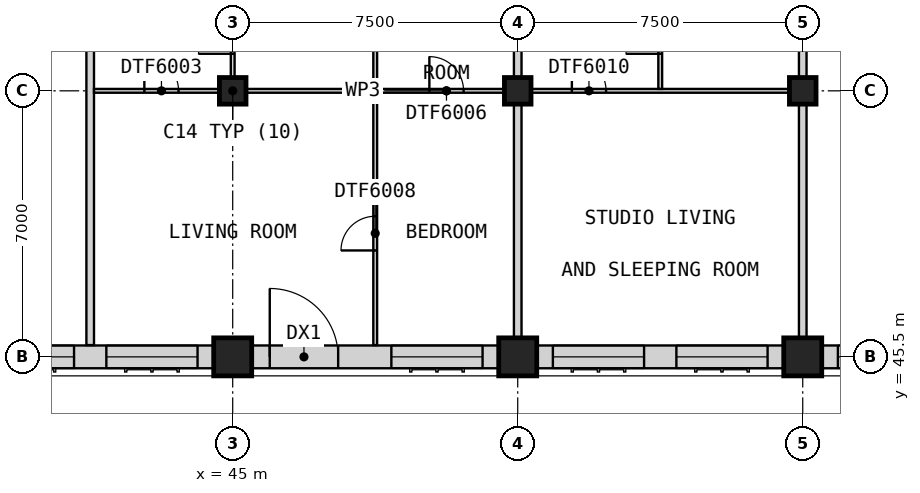
"""IFC4 building model, lengths in metres.
Left out: names, types, materials, properties, quantities, classifications, styles, units other than length and angle.
Written with IfcOpenShell. Run it as: python <this file> out.ifc"""

import sys

from ifc_helpers import new_model, si_unit, direction, frame, frame_2d, origin, origin_2d, place, context, subcontext, project, spatial, rectangle, extrude, element, fill, save


model = new_model("IFC4")
c1 = context("Model", 3, precision=1e-05, world=origin(), true_north=direction((0.0, 1.0)))
c2 = subcontext(c1, "Body", "Model", "MODEL_VIEW")
j1 = project(units=[si_unit("LENGTHUNIT", "METRE"), si_unit("PLANEANGLEUNIT", "RADIAN")], contexts=[c1])
p1 = place(None, origin())
s1 = spatial("IfcSite", under=j1, at=p1, CompositionType="ELEMENT")
p2 = place(p1, origin())
s2 = spatial("IfcBuilding", under=s1, at=p2, CompositionType="ELEMENT")
p3 = place(p2, frame((0.0, 0.0, 266.2)))
s3 = spatial("IfcBuildingStorey", under=s2, at=p3, CompositionType="ELEMENT", Elevation=266.2)
p4 = place(p3, frame((45.0, 45.5, 0.0), z_axis=(0.0, 0.0, 1.0), x_axis=(1.0, 0.0, 0.0)))
e1 = element("IfcColumn", 1, at=p4, inside=s3, PredefinedType="COLUMN", context=c2, shape_type="SweptSolid", body=[
    extrude(rectangle(XDim=1.0, YDim=1.0, at=origin_2d()), origin(), (0.0, 0.0, 1.0), 3.5),
])
p5 = place(p3, frame((45.0, 52.5, 0.0), z_axis=(0.0, 0.0, 1.0), x_axis=(1.0, 0.0, 0.0)))
e2 = element("IfcColumn", 2, at=p5, inside=s3, PredefinedType="COLUMN", context=c2, shape_type="SweptSolid", body=[
    extrude(rectangle(XDim=0.7, YDim=0.7, at=origin_2d()), origin(), (0.0, 0.0, 1.0), 3.5),
])
p6 = place(p3, frame((52.5, 45.5, 0.0), z_axis=(0.0, 0.0, 1.0), x_axis=(1.0, 0.0, 0.0)))
e3 = element("IfcColumn", 3, at=p6, inside=s3, PredefinedType="COLUMN", context=c2, shape_type="SweptSolid", body=[
    extrude(rectangle(XDim=1.0, YDim=1.0, at=origin_2d()), origin(), (0.0, 0.0, 1.0), 3.5),
])
p7 = place(p3, frame((52.5, 52.5, 0.0), z_axis=(0.0, 0.0, 1.0), x_axis=(1.0, 0.0, 0.0)))
e4 = element("IfcColumn", 4, at=p7, inside=s3, PredefinedType="COLUMN", context=c2, shape_type="SweptSolid", body=[
    extrude(rectangle(XDim=0.7, YDim=0.7, at=origin_2d()), origin(), (0.0, 0.0, 1.0), 3.5),
])
p8 = place(p3, frame((60.0, 45.5, 0.0), z_axis=(0.0, 0.0, 1.0), x_axis=(1.0, 0.0, 0.0)))
e5 = element("IfcColumn", 5, at=p8, inside=s3, PredefinedType="COLUMN", context=c2, shape_type="SweptSolid", body=[
    extrude(rectangle(XDim=1.0, YDim=1.0, at=origin_2d()), origin(), (0.0, 0.0, 1.0), 3.5),
])
p9 = place(p3, frame((60.0, 52.5, 0.0), z_axis=(0.0, 0.0, 1.0), x_axis=(1.0, 0.0, 0.0)))
e6 = element("IfcColumn", 6, at=p9, inside=s3, PredefinedType="COLUMN", context=c2, shape_type="SweptSolid", body=[
    extrude(rectangle(XDim=0.7, YDim=0.7, at=origin_2d()), origin(), (0.0, 0.0, 1.0), 3.5),
])
p10 = place(p3, frame((38.0, 45.5, 0.0), z_axis=(0.0, 0.0, 1.0), x_axis=(1.0, 0.0, 0.0)))
e7 = element("IfcWall", 7, at=p10, inside=s3, PredefinedType="SOLIDWALL", context=c2, shape_type="SweptSolid", body=[
    extrude(rectangle(XDim=6.5, YDim=0.6, at=frame_2d((3.25, 0.0))), origin(), (0.0, 0.0, 1.0), 2.75),
])
p11 = place(p10, frame((0.425, 0.0, 0.8)))
e8 = element("IfcOpeningElement", 8, at=p11, cuts=e7, PredefinedType="OPENING", context=c2, shape_type="SweptSolid", body=[
    extrude(rectangle(XDim=2.4, YDim=1.8, at=frame_2d((1.2, 0.9))), frame((0.0, 0.31, 0.0), z_axis=(0.0, -1.0, 0.0), x_axis=(1.0, 0.0, 0.0)), (0.0, 0.0, 1.0), 0.62),
])
p12 = place(p10, frame((3.675, 0.0, 0.8)))
e9 = element("IfcOpeningElement", 9, at=p12, cuts=e7, PredefinedType="OPENING", context=c2, shape_type="SweptSolid", body=[
    extrude(rectangle(XDim=2.4, YDim=1.8, at=frame_2d((1.2, 0.9))), frame((0.0, 0.31, 0.0), z_axis=(0.0, -1.0, 0.0), x_axis=(1.0, 0.0, 0.0)), (0.0, 0.0, 1.0), 0.62),
])
p13 = place(p3, frame((45.5, 45.5, 0.0), z_axis=(0.0, 0.0, 1.0), x_axis=(1.0, 0.0, 0.0)))
e10 = element("IfcWall", 10, at=p13, inside=s3, PredefinedType="SOLIDWALL", context=c2, shape_type="SweptSolid", body=[
    extrude(rectangle(XDim=6.5, YDim=0.6, at=frame_2d((3.25, 0.0))), origin(), (0.0, 0.0, 1.0), 2.75),
])
p14 = place(p13, frame((0.475, 0.0, 0.0)))
e11 = element("IfcOpeningElement", 11, at=p14, cuts=e10, PredefinedType="OPENING", context=c2, shape_type="SweptSolid", body=[
    extrude(rectangle(XDim=1.8, YDim=2.4, at=frame_2d((0.9, 1.2))), frame((0.0, 0.31, 0.0), z_axis=(0.0, -1.0, 0.0), x_axis=(1.0, 0.0, 0.0)), (0.0, 0.0, 1.0), 0.62),
])
p15 = place(p13, frame((3.675, 0.0, 0.8)))
e12 = element("IfcOpeningElement", 12, at=p15, cuts=e10, PredefinedType="OPENING", context=c2, shape_type="SweptSolid", body=[
    extrude(rectangle(XDim=2.4, YDim=1.8, at=frame_2d((1.2, 0.9))), frame((0.0, 0.31, 0.0), z_axis=(0.0, -1.0, 0.0), x_axis=(1.0, 0.0, 0.0)), (0.0, 0.0, 1.0), 0.62),
])
p16 = place(p3, frame((53.0, 45.5, 0.0), z_axis=(0.0, 0.0, 1.0), x_axis=(1.0, 0.0, 0.0)))
e13 = element("IfcWall", 13, at=p16, inside=s3, PredefinedType="SOLIDWALL", context=c2, shape_type="SweptSolid", body=[
    extrude(rectangle(XDim=6.5, YDim=0.6, at=frame_2d((3.25, 0.0))), origin(), (0.0, 0.0, 1.0), 2.75),
])
p17 = place(p16, frame((0.425, 0.0, 0.8)))
e14 = element("IfcOpeningElement", 14, at=p17, cuts=e13, PredefinedType="OPENING", context=c2, shape_type="SweptSolid", body=[
    extrude(rectangle(XDim=2.4, YDim=1.8, at=frame_2d((1.2, 0.9))), frame((0.0, 0.31, 0.0), z_axis=(0.0, -1.0, 0.0), x_axis=(1.0, 0.0, 0.0)), (0.0, 0.0, 1.0), 0.62),
])
p18 = place(p16, frame((3.675, 0.0, 0.8)))
e15 = element("IfcOpeningElement", 15, at=p18, cuts=e13, PredefinedType="OPENING", context=c2, shape_type="SweptSolid", body=[
    extrude(rectangle(XDim=2.4, YDim=1.8, at=frame_2d((1.2, 0.9))), frame((0.0, 0.31, 0.0), z_axis=(0.0, -1.0, 0.0), x_axis=(1.0, 0.0, 0.0)), (0.0, 0.0, 1.0), 0.62),
])
p19 = place(p3, frame((60.5, 45.5, 0.0), z_axis=(0.0, 0.0, 1.0), x_axis=(1.0, 0.0, 0.0)))
e16 = element("IfcWall", 16, at=p19, inside=s3, PredefinedType="SOLIDWALL", context=c2, shape_type="SweptSolid", body=[
    extrude(rectangle(XDim=6.5, YDim=0.6, at=frame_2d((3.25, 0.0))), origin(), (0.0, 0.0, 1.0), 2.75),
])
p20 = place(p19, frame((0.425, 0.0, 0.8)))
e17 = element("IfcOpeningElement", 17, at=p20, cuts=e16, PredefinedType="OPENING", context=c2, shape_type="SweptSolid", body=[
    extrude(rectangle(XDim=2.4, YDim=1.8, at=frame_2d((1.2, 0.9))), frame((0.0, 0.31, 0.0), z_axis=(0.0, -1.0, 0.0), x_axis=(1.0, 0.0, 0.0)), (0.0, 0.0, 1.0), 0.62),
])
p21 = place(p19, frame((3.675, 0.0, 0.8)))
e18 = element("IfcOpeningElement", 18, at=p21, cuts=e16, PredefinedType="OPENING", context=c2, shape_type="SweptSolid", body=[
    extrude(rectangle(XDim=2.4, YDim=1.8, at=frame_2d((1.2, 0.9))), frame((0.0, 0.31, 0.0), z_axis=(0.0, -1.0, 0.0), x_axis=(1.0, 0.0, 0.0)), (0.0, 0.0, 1.0), 0.62),
])
p22 = place(p3, frame((41.25, 45.81, 0.0), z_axis=(0.0, 0.0, 1.0), x_axis=(0.0, 1.0, 0.0)))
e19 = element("IfcWall", 19, at=p22, inside=s3, PredefinedType="PARTITIONING", context=c2, shape_type="SweptSolid", body=[
    extrude(rectangle(XDim=12.315, YDim=0.2, at=frame_2d((6.157, 0.0))), origin(), (0.0, 0.0, 1.0), 3.25),
])
for number, where, z_axis, x_axis in (
    (20, (52.5, 45.0, 0.0), (0.0, 0.0, 1.0), (0.0, 1.0, 0.0)),
    (21, (60.0, 45.0, 0.0), (0.0, 0.0, 1.0), (0.0, 1.0, 0.0)),
):
    element("IfcWall", number, at=place(p3, frame(where, z_axis=z_axis, x_axis=x_axis)), inside=s3, PredefinedType="PARTITIONING", context=c2, shape_type="SweptSolid", body=[
        extrude(rectangle(XDim=13.125, YDim=0.2, at=frame_2d((6.562, 0.0))), origin(), (0.0, 0.0, 1.0), 3.25),
    ])
p23 = place(p3, frame((41.35, 52.5, 0.0), z_axis=(0.0, 0.0, 1.0), x_axis=(1.0, 0.0, 0.0)))
e22 = element("IfcWall", 22, at=p23, inside=s3, PredefinedType="PARTITIONING", context=c2, shape_type="SweptSolid", body=[
    extrude(rectangle(XDim=18.55, YDim=0.1, at=frame_2d((9.275, 0.0))), origin(), (0.0, 0.0, 1.0), 3.25),
])
p24 = place(p23, frame((1.325, 0.0, 0.0)))
e23 = element("IfcOpeningElement", 23, at=p24, cuts=e22, PredefinedType="OPENING", context=c2, shape_type="SweptSolid", body=[
    extrude(rectangle(XDim=0.9, YDim=2.1, at=frame_2d((0.45, 1.05))), frame((0.0, 0.06, 0.0), z_axis=(0.0, -1.0, 0.0), x_axis=(1.0, 0.0, 0.0)), (0.0, 0.0, 1.0), 0.12),
])
p25 = place(p23, frame((8.825, 0.0, 0.0)))
e24 = element("IfcOpeningElement", 24, at=p25, cuts=e22, PredefinedType="OPENING", context=c2, shape_type="SweptSolid", body=[
    extrude(rectangle(XDim=0.9, YDim=2.1, at=frame_2d((0.45, 1.05))), frame((0.0, 0.06, 0.0), z_axis=(0.0, -1.0, 0.0), x_axis=(1.0, 0.0, 0.0)), (0.0, 0.0, 1.0), 0.12),
])
p26 = place(p23, frame((12.575, 0.0, 0.0)))
e25 = element("IfcOpeningElement", 25, at=p26, cuts=e22, PredefinedType="OPENING", context=c2, shape_type="SweptSolid", body=[
    extrude(rectangle(XDim=0.9, YDim=2.1, at=frame_2d((0.45, 1.05))), frame((0.0, 0.06, 0.0), z_axis=(0.0, -1.0, 0.0), x_axis=(1.0, 0.0, 0.0)), (0.0, 0.0, 1.0), 0.12),
])
p27 = place(p3, frame((45.0, 52.55, 0.0), z_axis=(0.0, 0.0, 1.0), x_axis=(0.0, 1.0, 0.0)))
e26 = element("IfcWall", 26, at=p27, inside=s3, PredefinedType="PARTITIONING", context=c2, shape_type="SweptSolid", body=[
    extrude(rectangle(XDim=2.738, YDim=0.1, at=frame_2d((1.369, 0.0))), origin(), (0.0, 0.0, 1.0), 3.25),
])
p28 = place(p27, frame((0.925, 0.0, 0.0)))
e27 = element("IfcOpeningElement", 27, at=p28, cuts=e26, PredefinedType="OPENING", context=c2, shape_type="SweptSolid", body=[
    extrude(rectangle(XDim=0.9, YDim=2.1, at=frame_2d((0.45, 1.05))), frame((0.0, 0.06, 0.0), z_axis=(0.0, -1.0, 0.0), x_axis=(1.0, 0.0, 0.0)), (0.0, 0.0, 1.0), 0.12),
])
p29 = place(p3, frame((48.75, 45.81, 0.0), z_axis=(0.0, 0.0, 1.0), x_axis=(0.0, 1.0, 0.0)))
e28 = element("IfcWall", 28, at=p29, inside=s3, PredefinedType="PARTITIONING", context=c2, shape_type="SweptSolid", body=[
    extrude(rectangle(XDim=9.478, YDim=0.1, at=frame_2d((4.739, 0.0))), origin(), (0.0, 0.0, 1.0), 3.25),
])
p30 = place(p29, frame((2.49, 0.0, 0.0)))
e29 = element("IfcOpeningElement", 29, at=p30, cuts=e28, PredefinedType="OPENING", context=c2, shape_type="SweptSolid", body=[
    extrude(rectangle(XDim=0.9, YDim=2.1, at=frame_2d((0.45, 1.05))), frame((0.0, 0.06, 0.0), z_axis=(0.0, -1.0, 0.0), x_axis=(1.0, 0.0, 0.0)), (0.0, 0.0, 1.0), 0.12),
])
p31 = place(p3, frame((56.25, 52.55, 0.0), z_axis=(0.0, 0.0, 1.0), x_axis=(0.0, 1.0, 0.0)))
e30 = element("IfcWall", 30, at=p31, inside=s3, PredefinedType="PARTITIONING", context=c2, shape_type="SweptSolid", body=[
    extrude(rectangle(XDim=2.738, YDim=0.1, at=frame_2d((1.369, 0.0))), origin(), (0.0, 0.0, 1.0), 3.25),
])
p32 = place(p31, frame((0.925, 0.0, 0.0)))
e31 = element("IfcOpeningElement", 31, at=p32, cuts=e30, PredefinedType="OPENING", context=c2, shape_type="SweptSolid", body=[
    extrude(rectangle(XDim=0.9, YDim=2.1, at=frame_2d((0.45, 1.05))), frame((0.0, 0.06, 0.0), z_axis=(0.0, -1.0, 0.0), x_axis=(1.0, 0.0, 0.0)), (0.0, 0.0, 1.0), 0.12),
])
p33 = place(p11, origin())
e32 = element("IfcWindow", 32, at=p33, inside=s3, PartitioningType="SINGLE_PANEL", PredefinedType="WINDOW", context=c2, shape_type="SweptSolid", body=[
    extrude(rectangle(XDim=2.4, YDim=1.8, at=frame_2d((1.2, 0.9))), frame((0.0, -0.07, 0.0), z_axis=(0.0, -1.0, 0.0), x_axis=(1.0, 0.0, 0.0)), (0.0, 0.0, 1.0), 0.06),
])
fill(e8, e32)
p34 = place(p12, origin())
e33 = element("IfcWindow", 33, at=p34, inside=s3, PartitioningType="SINGLE_PANEL", PredefinedType="WINDOW", context=c2, shape_type="SweptSolid", body=[
    extrude(rectangle(XDim=2.4, YDim=1.8, at=frame_2d((1.2, 0.9))), frame((0.0, -0.07, 0.0), z_axis=(0.0, -1.0, 0.0), x_axis=(1.0, 0.0, 0.0)), (0.0, 0.0, 1.0), 0.06),
])
fill(e9, e33)
p35 = place(p14, origin())
e34 = element("IfcDoor", 34, at=p35, inside=s3, OperationType="SINGLE_SWING_LEFT", PredefinedType="DOOR", context=c2, shape_type="SweptSolid", body=[
    extrude(rectangle(XDim=1.8, YDim=2.4, at=frame_2d((0.9, 1.2))), frame((0.0, -0.075, 0.0), z_axis=(0.0, -1.0, 0.0), x_axis=(1.0, 0.0, 0.0)), (0.0, 0.0, 1.0), 0.05),
])
fill(e11, e34)
p36 = place(p15, origin())
e35 = element("IfcWindow", 35, at=p36, inside=s3, PartitioningType="SINGLE_PANEL", PredefinedType="WINDOW", context=c2, shape_type="SweptSolid", body=[
    extrude(rectangle(XDim=2.4, YDim=1.8, at=frame_2d((1.2, 0.9))), frame((0.0, -0.07, 0.0), z_axis=(0.0, -1.0, 0.0), x_axis=(1.0, 0.0, 0.0)), (0.0, 0.0, 1.0), 0.06),
])
fill(e12, e35)
p37 = place(p17, origin())
e36 = element("IfcWindow", 36, at=p37, inside=s3, PartitioningType="SINGLE_PANEL", PredefinedType="WINDOW", context=c2, shape_type="SweptSolid", body=[
    extrude(rectangle(XDim=2.4, YDim=1.8, at=frame_2d((1.2, 0.9))), frame((0.0, -0.07, 0.0), z_axis=(0.0, -1.0, 0.0), x_axis=(1.0, 0.0, 0.0)), (0.0, 0.0, 1.0), 0.06),
])
fill(e14, e36)
p38 = place(p18, origin())
e37 = element("IfcWindow", 37, at=p38, inside=s3, PartitioningType="SINGLE_PANEL", PredefinedType="WINDOW", context=c2, shape_type="SweptSolid", body=[
    extrude(rectangle(XDim=2.4, YDim=1.8, at=frame_2d((1.2, 0.9))), frame((0.0, -0.07, 0.0), z_axis=(0.0, -1.0, 0.0), x_axis=(1.0, 0.0, 0.0)), (0.0, 0.0, 1.0), 0.06),
])
fill(e15, e37)
p39 = place(p20, origin())
e38 = element("IfcWindow", 38, at=p39, inside=s3, PartitioningType="SINGLE_PANEL", PredefinedType="WINDOW", context=c2, shape_type="SweptSolid", body=[
    extrude(rectangle(XDim=2.4, YDim=1.8, at=frame_2d((1.2, 0.9))), frame((0.0, -0.07, 0.0), z_axis=(0.0, -1.0, 0.0), x_axis=(1.0, 0.0, 0.0)), (0.0, 0.0, 1.0), 0.06),
])
fill(e17, e38)
p40 = place(p24, origin())
e39 = element("IfcDoor", 39, at=p40, inside=s3, OperationType="SINGLE_SWING_LEFT", PredefinedType="DOOR", context=c2, shape_type="SweptSolid", body=[
    extrude(rectangle(XDim=0.9, YDim=2.1, at=frame_2d((0.45, 1.05))), frame((0.0, 0.025, 0.0), z_axis=(0.0, -1.0, 0.0), x_axis=(1.0, 0.0, 0.0)), (0.0, 0.0, 1.0), 0.05),
])
fill(e23, e39)
p41 = place(p28, origin())
e40 = element("IfcDoor", 40, at=p41, inside=s3, OperationType="SINGLE_SWING_RIGHT", PredefinedType="DOOR", context=c2, shape_type="SweptSolid", body=[
    extrude(rectangle(XDim=0.9, YDim=2.1, at=frame_2d((0.45, 1.05))), frame((0.0, 0.025, 0.0), z_axis=(0.0, -1.0, 0.0), x_axis=(1.0, 0.0, 0.0)), (0.0, 0.0, 1.0), 0.05),
])
fill(e27, e40)
p42 = place(p25, origin())
e41 = element("IfcDoor", 41, at=p42, inside=s3, OperationType="SINGLE_SWING_LEFT", PredefinedType="DOOR", context=c2, shape_type="SweptSolid", body=[
    extrude(rectangle(XDim=0.9, YDim=2.1, at=frame_2d((0.45, 1.05))), frame((0.0, 0.025, 0.0), z_axis=(0.0, -1.0, 0.0), x_axis=(1.0, 0.0, 0.0)), (0.0, 0.0, 1.0), 0.05),
])
fill(e24, e41)
p43 = place(p30, origin())
e42 = element("IfcDoor", 42, at=p43, inside=s3, OperationType="SINGLE_SWING_LEFT", PredefinedType="DOOR", context=c2, shape_type="SweptSolid", body=[
    extrude(rectangle(XDim=0.9, YDim=2.1, at=frame_2d((0.45, 1.05))), frame((0.0, 0.025, 0.0), z_axis=(0.0, -1.0, 0.0), x_axis=(1.0, 0.0, 0.0)), (0.0, 0.0, 1.0), 0.05),
])
fill(e29, e42)
p44 = place(p26, origin())
e43 = element("IfcDoor", 43, at=p44, inside=s3, OperationType="SINGLE_SWING_LEFT", PredefinedType="DOOR", context=c2, shape_type="SweptSolid", body=[
    extrude(rectangle(XDim=0.9, YDim=2.1, at=frame_2d((0.45, 1.05))), frame((0.0, 0.025, 0.0), z_axis=(0.0, -1.0, 0.0), x_axis=(1.0, 0.0, 0.0)), (0.0, 0.0, 1.0), 0.05),
])
fill(e25, e43)
p45 = place(p32, origin())
e44 = element("IfcDoor", 44, at=p45, inside=s3, OperationType="SINGLE_SWING_RIGHT", PredefinedType="DOOR", context=c2, shape_type="SweptSolid", body=[
    extrude(rectangle(XDim=0.9, YDim=2.1, at=frame_2d((0.45, 1.05))), frame((0.0, 0.025, 0.0), z_axis=(0.0, -1.0, 0.0), x_axis=(1.0, 0.0, 0.0)), (0.0, 0.0, 1.0), 0.05),
])
fill(e31, e44)
save(model, sys.argv[1])
